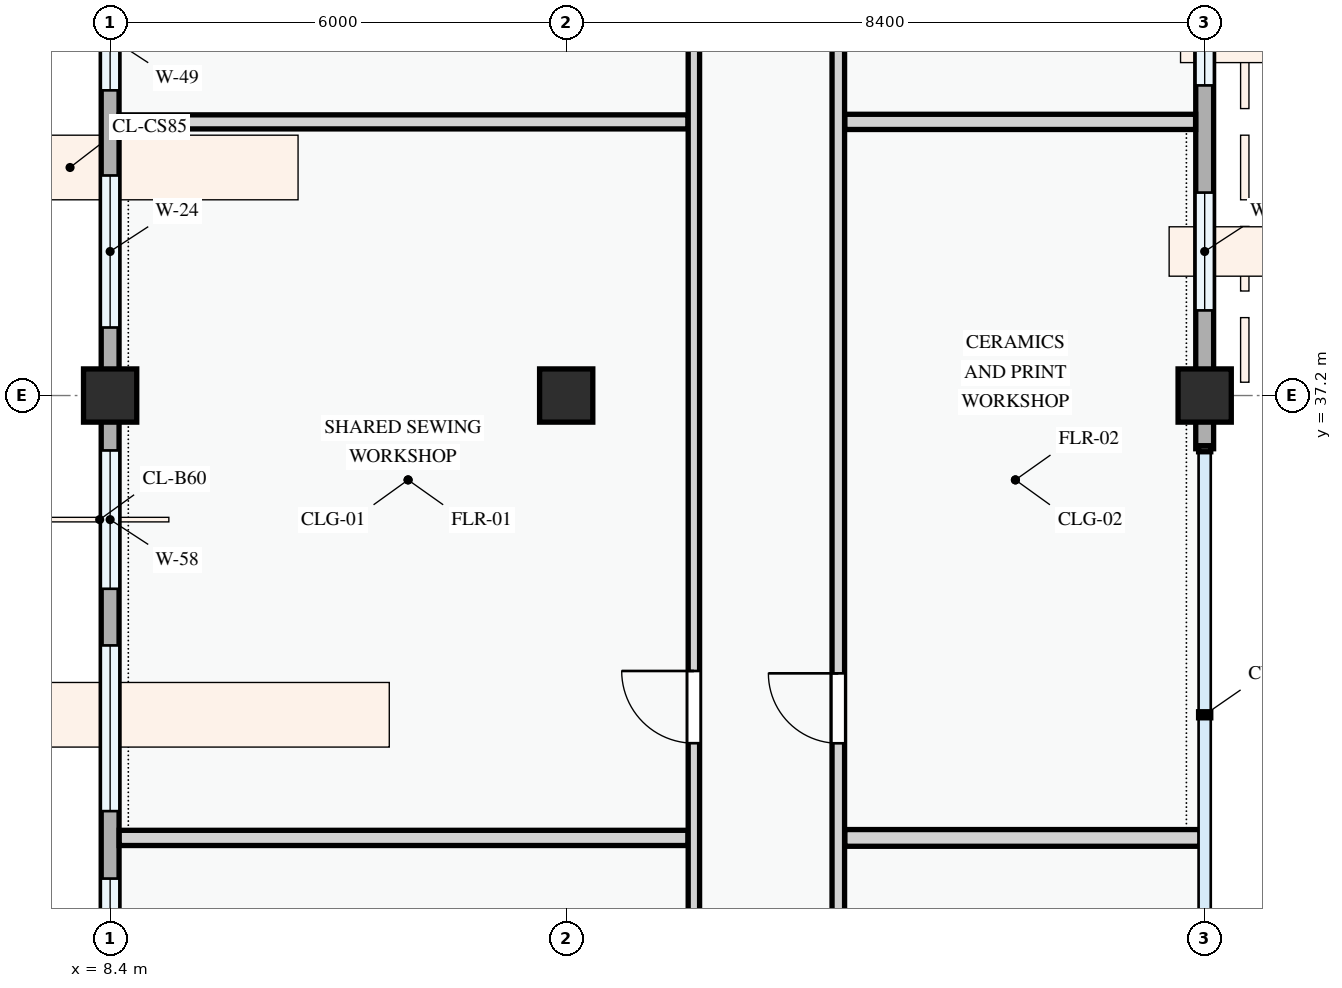
"""IFC4 building model, lengths in metres.
Left out: names, types, materials, properties, quantities, classifications, styles, units other than length and angle.
Written with IfcOpenShell. Run it as: python <this file> out.ifc"""

import sys

from ifc_helpers import new_model, si_unit, direction, frame, frame_2d, origin, origin_2d, place, context, subcontext, project, spatial, rectangle, extrude, element, fill, save


model = new_model("IFC4")
c1 = context("Model", 3, precision=1e-05, world=origin(), true_north=direction((0.0, 1.0)))
c2 = subcontext(c1, "Body", "Model", "MODEL_VIEW")
j1 = project(units=[si_unit("LENGTHUNIT", "METRE"), si_unit("PLANEANGLEUNIT", "RADIAN")], contexts=[c1])
p1 = place(None, origin())
s1 = spatial("IfcSite", under=j1, at=p1, CompositionType="ELEMENT")
p2 = place(p1, origin())
s2 = spatial("IfcBuilding", under=s1, at=p2, CompositionType="ELEMENT")
p3 = place(p2, frame((0.0, 0.0, 4.5)))
s3 = spatial("IfcBuildingStorey", under=s2, at=p3, CompositionType="ELEMENT", Elevation=4.5)
for number, where, z_axis, x_axis in (
    (1, (8.4, 37.2, 0.0), (0.0, 0.0, 1.0), (1.0, 0.0, 0.0)),
    (2, (14.4, 37.2, 0.0), (0.0, 0.0, 1.0), (1.0, 0.0, 0.0)),
    (3, (22.8, 37.2, 0.0), (0.0, 0.0, 1.0), (1.0, 0.0, 0.0)),
):
    element("IfcColumn", number, at=place(p3, frame(where, z_axis=z_axis, x_axis=x_axis)), inside=s3, PredefinedType="COLUMN", context=c2, shape_type="SweptSolid", body=[
        extrude(rectangle(XDim=0.7, YDim=0.7, at=origin_2d()), origin(), (0.0, 0.0, 1.0), 3.6),
    ])
p4 = place(p3, frame((22.8, 36.5, 0.0), z_axis=(0.0, 0.0, 1.0), x_axis=(0.0, 1.0, 0.0)))
e4 = element("IfcWall", 4, at=p4, inside=s3, PredefinedType="STANDARD", context=c2, shape_type="SweptSolid", body=[
    extrude(rectangle(XDim=0.7, YDim=0.235, at=frame_2d((0.35, 0.0))), origin(), (0.0, 0.0, 1.0), 2.725),
])
p5 = place(p3, frame((22.8, 37.2, 0.0), z_axis=(0.0, 0.0, 1.0), x_axis=(0.0, 1.0, 0.0)))
e5 = element("IfcWall", 5, at=p5, inside=s3, PredefinedType="STANDARD", context=c2, shape_type="SweptSolid", body=[
    extrude(rectangle(XDim=6.0, YDim=0.235, at=frame_2d((3.0, 0.0))), origin(), (0.0, 0.0, 1.0), 2.875),
])
p6 = place(p5, frame((1.12, 0.0, 0.78)))
e6 = element("IfcOpeningElement", 6, at=p6, cuts=e5, PredefinedType="OPENING", context=c2, shape_type="SweptSolid", body=[
    extrude(rectangle(XDim=1.55, YDim=1.4, at=frame_2d((0.775, 0.7))), frame((0.0, 0.127, 0.0), z_axis=(0.0, -1.0, 0.0), x_axis=(1.0, 0.0, 0.0)), (0.0, 0.0, 1.0), 0.255),
])
p7 = place(p5, frame((4.08, 0.0, 0.78)))
e7 = element("IfcOpeningElement", 7, at=p7, cuts=e5, PredefinedType="OPENING", context=c2, shape_type="SweptSolid", body=[
    extrude(rectangle(XDim=1.25, YDim=1.45, at=frame_2d((0.625, 0.725))), frame((0.0, 0.127, 0.0), z_axis=(0.0, -1.0, 0.0), x_axis=(1.0, 0.0, 0.0)), (0.0, 0.0, 1.0), 0.255),
])
p8 = place(p3, frame((8.4, 43.2, 0.0), z_axis=(0.0, 0.0, 1.0), x_axis=(0.0, -1.0, 0.0)))
e8 = element("IfcWall", 8, at=p8, inside=s3, PredefinedType="STANDARD", context=c2, shape_type="SweptSolid", body=[
    extrude(rectangle(XDim=6.0, YDim=0.235, at=frame_2d((3.0, 0.0))), origin(), (0.0, 0.0, 1.0), 2.875),
])
p9 = place(p8, frame((0.605, 0.0, 0.78)))
e9 = element("IfcOpeningElement", 9, at=p9, cuts=e8, PredefinedType="OPENING", context=c2, shape_type="SweptSolid", body=[
    extrude(rectangle(XDim=1.38, YDim=1.48, at=frame_2d((0.69, 0.74))), frame((0.0, 0.127, 0.0), z_axis=(0.0, -1.0, 0.0), x_axis=(1.0, 0.0, 0.0)), (0.0, 0.0, 1.0), 0.255),
])
p10 = place(p8, frame((3.105, 0.0, 0.78)))
e10 = element("IfcOpeningElement", 10, at=p10, cuts=e8, PredefinedType="OPENING", context=c2, shape_type="SweptSolid", body=[
    extrude(rectangle(XDim=2.0, YDim=1.75, at=frame_2d((1.0, 0.875))), frame((0.0, 0.127, 0.0), z_axis=(0.0, -1.0, 0.0), x_axis=(1.0, 0.0, 0.0)), (0.0, 0.0, 1.0), 0.255),
])
p11 = place(p3, frame((8.4, 37.2, 0.0), z_axis=(0.0, 0.0, 1.0), x_axis=(0.0, -1.0, 0.0)))
e11 = element("IfcWall", 11, at=p11, inside=s3, PredefinedType="STANDARD", context=c2, shape_type="SweptSolid", body=[
    extrude(rectangle(XDim=8.4, YDim=0.235, at=frame_2d((4.2, 0.0))), origin(), (0.0, 0.0, 1.0), 2.725),
])
p12 = place(p11, frame((0.722, 0.0, 0.78)))
e12 = element("IfcOpeningElement", 12, at=p12, cuts=e11, PredefinedType="OPENING", context=c2, shape_type="SweptSolid", body=[
    extrude(rectangle(XDim=1.82, YDim=1.46, at=frame_2d((0.91, 0.73))), frame((0.0, 0.127, 0.0), z_axis=(0.0, -1.0, 0.0), x_axis=(1.0, 0.0, 0.0)), (0.0, 0.0, 1.0), 0.255),
])
p13 = place(p11, frame((3.288, 0.0, 0.78)))
e13 = element("IfcOpeningElement", 13, at=p13, cuts=e11, PredefinedType="OPENING", context=c2, shape_type="SweptSolid", body=[
    extrude(rectangle(XDim=2.18, YDim=1.48, at=frame_2d((1.09, 0.74))), frame((0.0, 0.127, 0.0), z_axis=(0.0, -1.0, 0.0), x_axis=(1.0, 0.0, 0.0)), (0.0, 0.0, 1.0), 0.255),
])
p14 = place(p11, frame((6.355, 0.0, 0.78)))
e14 = element("IfcOpeningElement", 14, at=p14, cuts=e11, PredefinedType="OPENING", context=c2, shape_type="SweptSolid", body=[
    extrude(rectangle(XDim=1.32, YDim=1.35, at=frame_2d((0.66, 0.675))), frame((0.0, 0.127, 0.0), z_axis=(0.0, -1.0, 0.0), x_axis=(1.0, 0.0, 0.0)), (0.0, 0.0, 1.0), 0.255),
])
p15 = place(p3, frame((8.52, 31.38, 0.0), z_axis=(0.0, 0.0, 1.0), x_axis=(1.0, 0.0, 0.0)))
e15 = element("IfcWall", 15, at=p15, inside=s3, PredefinedType="PARTITIONING", context=c2, shape_type="SweptSolid", body=[
    extrude(rectangle(XDim=7.483, YDim=0.2, at=frame_2d((3.742, 0.0))), origin(), (0.0, 0.0, 1.0), 3.3),
])
p16 = place(p3, frame((18.064, 31.38, 0.0), z_axis=(0.0, 0.0, 1.0), x_axis=(1.0, 0.0, 0.0)))
e16 = element("IfcWall", 16, at=p16, inside=s3, PredefinedType="PARTITIONING", context=c2, shape_type="SweptSolid", body=[
    extrude(rectangle(XDim=4.676, YDim=0.22, at=frame_2d((2.338, 0.0))), origin(), (0.0, 0.0, 1.0), 3.3),
])
p17 = place(p3, frame((8.52, 40.8, 0.0), z_axis=(0.0, 0.0, 1.0), x_axis=(1.0, 0.0, 0.0)))
e17 = element("IfcWall", 17, at=p17, inside=s3, PredefinedType="PARTITIONING", context=c2, shape_type="SweptSolid", body=[
    extrude(rectangle(XDim=7.483, YDim=0.185, at=frame_2d((3.742, 0.0))), origin(), (0.0, 0.0, 1.0), 3.3),
])
p18 = place(p3, frame((18.064, 40.8, 0.0), z_axis=(0.0, 0.0, 1.0), x_axis=(1.0, 0.0, 0.0)))
e18 = element("IfcWall", 18, at=p18, inside=s3, PredefinedType="PARTITIONING", context=c2, shape_type="SweptSolid", body=[
    extrude(rectangle(XDim=4.616, YDim=0.2, at=frame_2d((2.308, 0.0))), origin(), (0.0, 0.0, 1.0), 3.3),
])
p19 = place(p3, frame((16.08, 22.66, 0.0), z_axis=(0.0, 0.0, 1.0), x_axis=(0.0, 1.0, 0.0)))
e19 = element("IfcWall", 19, at=p19, inside=s3, PredefinedType="PARTITIONING", context=c2, shape_type="SweptSolid", body=[
    extrude(rectangle(XDim=34.821, YDim=0.15, at=frame_2d((17.41, 0.0))), origin(), (0.0, 0.0, 1.0), 3.3),
])
p20 = place(p19, frame((2.749, 0.0, 0.0)))
e20 = element("IfcOpeningElement", 20, at=p20, cuts=e19, PredefinedType="OPENING", context=c2, shape_type="SweptSolid", body=[
    extrude(rectangle(XDim=0.95, YDim=2.1, at=frame_2d((0.475, 1.05))), frame((0.0, 0.085, 0.0), z_axis=(0.0, -1.0, 0.0), x_axis=(1.0, 0.0, 0.0)), (0.0, 0.0, 1.0), 0.17),
])
p21 = place(p19, frame((9.966, 0.0, 0.0)))
e21 = element("IfcOpeningElement", 21, at=p21, cuts=e19, PredefinedType="OPENING", context=c2, shape_type="SweptSolid", body=[
    extrude(rectangle(XDim=0.95, YDim=2.1, at=frame_2d((0.475, 1.05))), frame((0.0, 0.085, 0.0), z_axis=(0.0, -1.0, 0.0), x_axis=(1.0, 0.0, 0.0)), (0.0, 0.0, 1.0), 0.17),
])
p22 = place(p19, frame((24.343, 0.0, 0.0)))
e22 = element("IfcOpeningElement", 22, at=p22, cuts=e19, PredefinedType="OPENING", context=c2, shape_type="SweptSolid", body=[
    extrude(rectangle(XDim=0.95, YDim=2.1, at=frame_2d((0.475, 1.05))), frame((0.0, 0.085, 0.0), z_axis=(0.0, -1.0, 0.0), x_axis=(1.0, 0.0, 0.0)), (0.0, 0.0, 1.0), 0.17),
])
p23 = place(p19, frame((31.542, 0.0, 0.0)))
e23 = element("IfcOpeningElement", 23, at=p23, cuts=e19, PredefinedType="OPENING", context=c2, shape_type="SweptSolid", body=[
    extrude(rectangle(XDim=0.95, YDim=2.1, at=frame_2d((0.475, 1.05))), frame((0.0, 0.085, 0.0), z_axis=(0.0, -1.0, 0.0), x_axis=(1.0, 0.0, 0.0)), (0.0, 0.0, 1.0), 0.17),
])
p24 = place(p3, frame((17.98, 22.66, 0.0), z_axis=(0.0, 0.0, 1.0), x_axis=(0.0, 1.0, 0.0)))
e24 = element("IfcWall", 24, at=p24, inside=s3, PredefinedType="PARTITIONING", context=c2, shape_type="SweptSolid", body=[
    extrude(rectangle(XDim=34.821, YDim=0.165, at=frame_2d((17.41, 0.0))), origin(), (0.0, 0.0, 1.0), 3.3),
])
p25 = place(p24, frame((2.746, 0.0, 0.0)))
e25 = element("IfcOpeningElement", 25, at=p25, cuts=e24, PredefinedType="OPENING", context=c2, shape_type="SweptSolid", body=[
    extrude(rectangle(XDim=0.96, YDim=2.12, at=frame_2d((0.48, 1.06))), frame((0.0, 0.093, 0.0), z_axis=(0.0, -1.0, 0.0), x_axis=(1.0, 0.0, 0.0)), (0.0, 0.0, 1.0), 0.185),
])
p26 = place(p24, frame((9.965, 0.0, 0.0)))
e26 = element("IfcOpeningElement", 26, at=p26, cuts=e24, PredefinedType="OPENING", context=c2, shape_type="SweptSolid", body=[
    extrude(rectangle(XDim=0.92, YDim=2.1, at=frame_2d((0.46, 1.05))), frame((0.0, 0.093, 0.0), z_axis=(0.0, -1.0, 0.0), x_axis=(1.0, 0.0, 0.0)), (0.0, 0.0, 1.0), 0.185),
])
p27 = place(p24, frame((24.335, 0.0, 0.0)))
e27 = element("IfcOpeningElement", 27, at=p27, cuts=e24, PredefinedType="OPENING", context=c2, shape_type="SweptSolid", body=[
    extrude(rectangle(XDim=0.92, YDim=2.1, at=frame_2d((0.46, 1.05))), frame((0.0, 0.093, 0.0), z_axis=(0.0, -1.0, 0.0), x_axis=(1.0, 0.0, 0.0)), (0.0, 0.0, 1.0), 0.185),
])
p28 = place(p24, frame((31.535, 0.0, 0.0)))
e28 = element("IfcOpeningElement", 28, at=p28, cuts=e24, PredefinedType="OPENING", context=c2, shape_type="SweptSolid", body=[
    extrude(rectangle(XDim=0.92, YDim=2.1, at=frame_2d((0.46, 1.05))), frame((0.0, 0.093, 0.0), z_axis=(0.0, -1.0, 0.0), x_axis=(1.0, 0.0, 0.0)), (0.0, 0.0, 1.0), 0.185),
])
p29 = place(p6, origin())
e29 = element("IfcWindow", 29, at=p29, inside=s3, PartitioningType="SINGLE_PANEL", PredefinedType="WINDOW", context=c2, shape_type="SweptSolid", body=[
    extrude(rectangle(XDim=1.55, YDim=1.4, at=frame_2d((0.775, 0.7))), frame((0.0, 0.03, 0.0), z_axis=(0.0, -1.0, 0.0), x_axis=(1.0, 0.0, 0.0)), (0.0, 0.0, 1.0), 0.06),
])
fill(e6, e29)
p30 = place(p7, origin())
e30 = element("IfcWindow", 30, at=p30, inside=s3, PartitioningType="SINGLE_PANEL", PredefinedType="WINDOW", context=c2, shape_type="SweptSolid", body=[
    extrude(rectangle(XDim=1.25, YDim=1.45, at=frame_2d((0.625, 0.725))), frame((0.0, 0.03, 0.0), z_axis=(0.0, -1.0, 0.0), x_axis=(1.0, 0.0, 0.0)), (0.0, 0.0, 1.0), 0.06),
])
fill(e7, e30)
p31 = place(p9, origin())
e31 = element("IfcWindow", 31, at=p31, inside=s3, PartitioningType="SINGLE_PANEL", PredefinedType="WINDOW", context=c2, shape_type="SweptSolid", body=[
    extrude(rectangle(XDim=1.38, YDim=1.48, at=frame_2d((0.69, 0.74))), frame((0.0, 0.03, 0.0), z_axis=(0.0, -1.0, 0.0), x_axis=(1.0, 0.0, 0.0)), (0.0, 0.0, 1.0), 0.06),
])
fill(e9, e31)
p32 = place(p10, origin())
e32 = element("IfcWindow", 32, at=p32, inside=s3, PartitioningType="DOUBLE_PANEL_VERTICAL", PredefinedType="WINDOW", context=c2, shape_type="SweptSolid", body=[
    extrude(rectangle(XDim=2.0, YDim=1.75, at=frame_2d((1.0, 0.875))), frame((0.0, 0.03, 0.0), z_axis=(0.0, -1.0, 0.0), x_axis=(1.0, 0.0, 0.0)), (0.0, 0.0, 1.0), 0.06),
])
fill(e10, e32)
p33 = place(p12, origin())
e33 = element("IfcWindow", 33, at=p33, inside=s3, PartitioningType="DOUBLE_PANEL_VERTICAL", PredefinedType="WINDOW", context=c2, shape_type="SweptSolid", body=[
    extrude(rectangle(XDim=1.82, YDim=1.46, at=frame_2d((0.91, 0.73))), frame((0.0, 0.03, 0.0), z_axis=(0.0, -1.0, 0.0), x_axis=(1.0, 0.0, 0.0)), (0.0, 0.0, 1.0), 0.06),
])
fill(e12, e33)
p34 = place(p13, origin())
e34 = element("IfcWindow", 34, at=p34, inside=s3, PartitioningType="DOUBLE_PANEL_VERTICAL", PredefinedType="WINDOW", context=c2, shape_type="SweptSolid", body=[
    extrude(rectangle(XDim=2.18, YDim=1.48, at=frame_2d((1.09, 0.74))), frame((0.0, 0.03, 0.0), z_axis=(0.0, -1.0, 0.0), x_axis=(1.0, 0.0, 0.0)), (0.0, 0.0, 1.0), 0.06),
])
fill(e13, e34)
p35 = place(p14, origin())
e35 = element("IfcWindow", 35, at=p35, inside=s3, PartitioningType="SINGLE_PANEL", PredefinedType="WINDOW", context=c2, shape_type="SweptSolid", body=[
    extrude(rectangle(XDim=1.32, YDim=1.35, at=frame_2d((0.66, 0.675))), frame((0.0, 0.03, 0.0), z_axis=(0.0, -1.0, 0.0), x_axis=(1.0, 0.0, 0.0)), (0.0, 0.0, 1.0), 0.06),
])
fill(e14, e35)
p36 = place(p21, origin())
e36 = element("IfcDoor", 36, at=p36, inside=s3, OperationType="SINGLE_SWING_RIGHT", PredefinedType="DOOR", context=c2, shape_type="SweptSolid", body=[
    extrude(rectangle(XDim=0.95, YDim=2.1, at=frame_2d((0.475, 1.05))), frame((0.0, 0.025, 0.0), z_axis=(0.0, -1.0, 0.0), x_axis=(1.0, 0.0, 0.0)), (0.0, 0.0, 1.0), 0.05),
])
fill(e21, e36)
p37 = place(p26, origin())
e37 = element("IfcDoor", 37, at=p37, inside=s3, OperationType="SINGLE_SWING_RIGHT", PredefinedType="DOOR", context=c2, shape_type="SweptSolid", body=[
    extrude(rectangle(XDim=0.92, YDim=2.1, at=frame_2d((0.46, 1.05))), frame((0.0, 0.025, 0.0), z_axis=(0.0, -1.0, 0.0), x_axis=(1.0, 0.0, 0.0)), (0.0, 0.0, 1.0), 0.05),
])
fill(e26, e37)
save(model, sys.argv[1])
